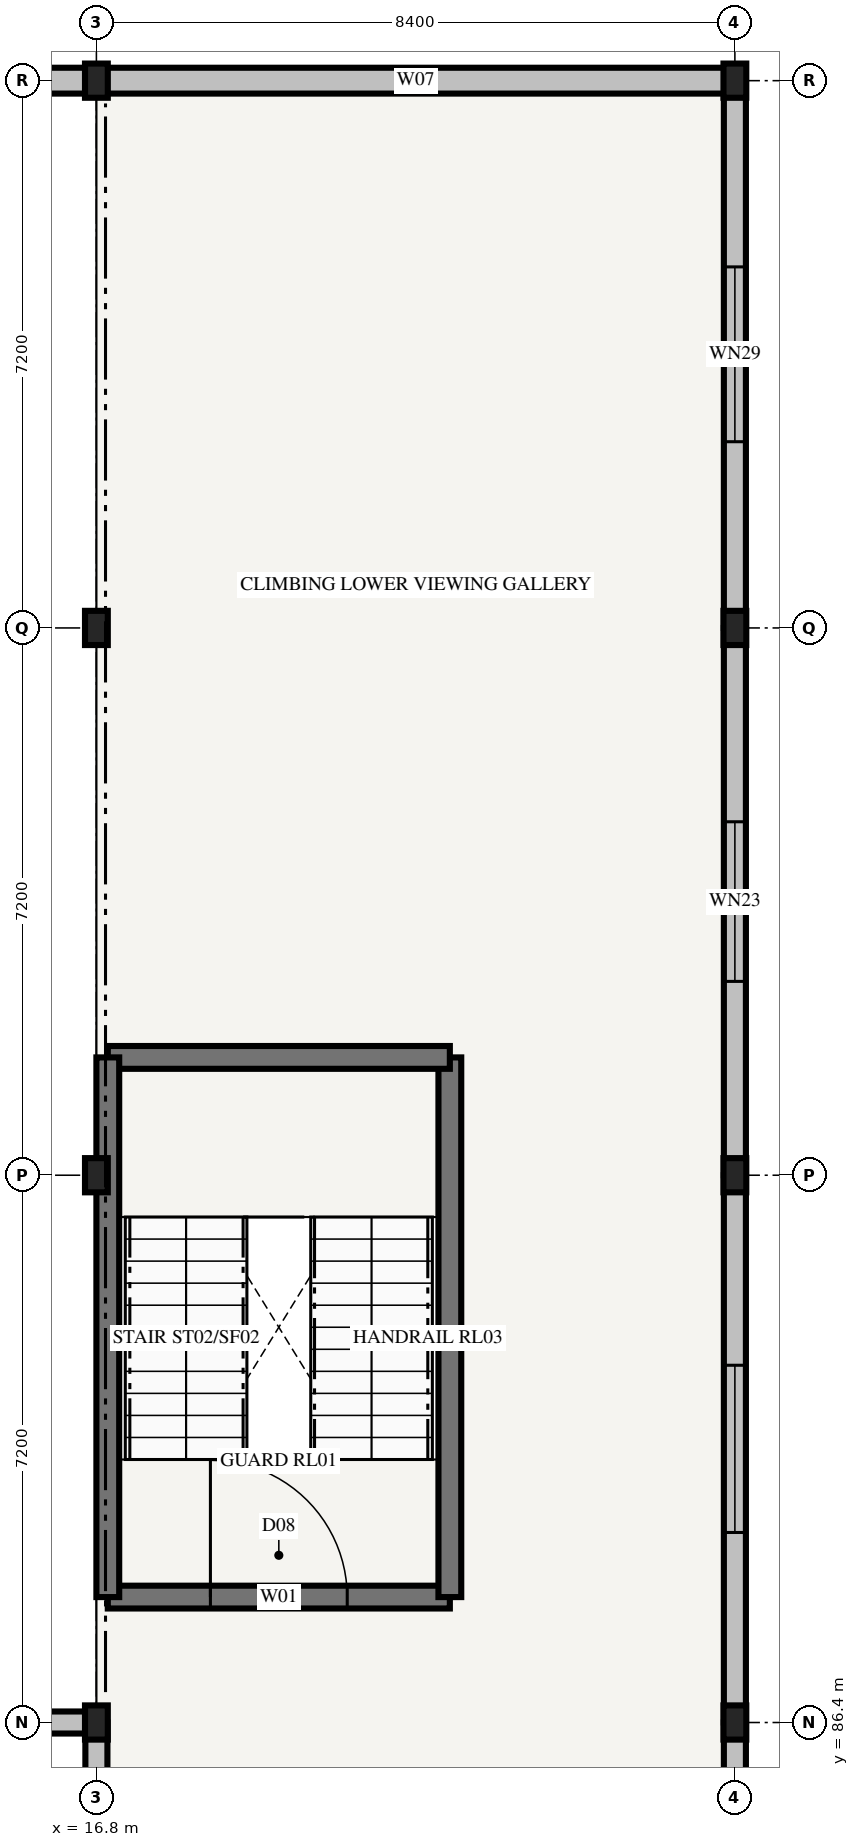
"""IFC4 building model, lengths in metres.
Left out: names, types, materials, properties, quantities, classifications, styles, units other than length and angle.
Written with IfcOpenShell. Run it as: python <this file> out.ifc"""

import sys

from ifc_helpers import new_model, si_unit, direction, frame, frame_2d, origin, origin_2d, place, context, subcontext, project, spatial, rectangle, i_section, extrude, element, fill, save


model = new_model("IFC4")
c1 = context("Model", 3, precision=1e-05, world=origin(), true_north=direction((0.0, 1.0)))
c2 = subcontext(c1, "Body", "Model", "MODEL_VIEW")
j1 = project(units=[si_unit("LENGTHUNIT", "METRE"), si_unit("PLANEANGLEUNIT", "RADIAN")], contexts=[c1])
p1 = place(None, origin())
s1 = spatial("IfcSite", under=j1, at=p1, CompositionType="ELEMENT")
p2 = place(p1, origin())
s2 = spatial("IfcBuilding", under=s1, at=p2, CompositionType="ELEMENT")
p3 = place(p2, frame((0.0, 0.0, 4.5)))
s3 = spatial("IfcBuildingStorey", under=s2, at=p3, CompositionType="ELEMENT", Elevation=4.5)
for number, where, z_axis, x_axis in (
    (1, (16.8, 86.4, 0.0), (0.0, 0.0, 1.0), (1.0, 0.0, 0.0)),
    (2, (16.8, 93.6, 0.0), (0.0, 0.0, 1.0), (1.0, 0.0, 0.0)),
    (3, (16.8, 100.8, 0.0), (0.0, 0.0, 1.0), (1.0, 0.0, 0.0)),
    (4, (16.8, 108.0, 0.0), (0.0, 0.0, 1.0), (1.0, 0.0, 0.0)),
    (5, (25.2, 86.4, 0.0), (0.0, 0.0, 1.0), (1.0, 0.0, 0.0)),
    (6, (25.2, 93.6, 0.0), (0.0, 0.0, 1.0), (1.0, 0.0, 0.0)),
    (7, (25.2, 100.8, 0.0), (0.0, 0.0, 1.0), (1.0, 0.0, 0.0)),
    (8, (25.2, 108.0, 0.0), (0.0, 0.0, 1.0), (1.0, 0.0, 0.0)),
):
    element("IfcColumn", number, at=place(p3, frame(where, z_axis=z_axis, x_axis=x_axis)), inside=s3, PredefinedType="COLUMN", context=c2, shape_type="SweptSolid", body=[
        extrude(i_section(OverallWidth=0.3, OverallDepth=0.45, WebThickness=0.014, FlangeThickness=0.026, FilletRadius=0.027, at=origin_2d()), origin(), (0.0, 0.0, 1.0), 4.2),
    ])
p4 = place(p3, frame((16.8, 86.4, 0.0), z_axis=(0.0, 0.0, 1.0), x_axis=(0.0, -1.0, 0.0)))
e9 = element("IfcWall", 9, at=p4, inside=s3, PredefinedType="STANDARD", context=c2, shape_type="SweptSolid", body=[
    extrude(rectangle(XDim=7.2, YDim=0.29, at=frame_2d((3.6, 0.0))), origin(), (0.0, 0.0, 1.0), 3.385),
])
p5 = place(p4, frame((2.5, 0.0, 0.85)))
e10 = element("IfcOpeningElement", 10, at=p5, cuts=e9, PredefinedType="OPENING", context=c2, shape_type="SweptSolid", body=[
    extrude(rectangle(XDim=2.2, YDim=1.55, at=frame_2d((1.1, 0.775))), frame((0.0, 0.17, 0.0), z_axis=(0.0, -1.0, 0.0), x_axis=(1.0, 0.0, 0.0)), (0.0, 0.0, 1.0), 0.34),
])
p6 = place(p3, frame((25.2, 79.2, 0.0), z_axis=(0.0, 0.0, 1.0), x_axis=(0.0, 1.0, 0.0)))
e11 = element("IfcWall", 11, at=p6, inside=s3, PredefinedType="STANDARD", context=c2, shape_type="SweptSolid", body=[
    extrude(rectangle(XDim=7.2, YDim=0.29, at=frame_2d((3.6, 0.0))), origin(), (0.0, 0.0, 1.0), 3.385),
])
p7 = place(p6, frame((2.7, 0.0, 0.85)))
e12 = element("IfcOpeningElement", 12, at=p7, cuts=e11, PredefinedType="OPENING", context=c2, shape_type="SweptSolid", body=[
    extrude(rectangle(XDim=1.8, YDim=1.8, at=frame_2d((0.9, 0.9))), frame((0.0, 0.17, 0.0), z_axis=(0.0, -1.0, 0.0), x_axis=(1.0, 0.0, 0.0)), (0.0, 0.0, 1.0), 0.34),
])
p8 = place(p3, frame((25.2, 86.4, 0.0), z_axis=(0.0, 0.0, 1.0), x_axis=(0.0, 1.0, 0.0)))
e13 = element("IfcWall", 13, at=p8, inside=s3, PredefinedType="STANDARD", context=c2, shape_type="SweptSolid", body=[
    extrude(rectangle(XDim=7.2, YDim=0.29, at=frame_2d((3.6, 0.0))), origin(), (0.0, 0.0, 1.0), 3.385),
])
p9 = place(p8, frame((2.5, 0.0, 0.85)))
e14 = element("IfcOpeningElement", 14, at=p9, cuts=e13, PredefinedType="OPENING", context=c2, shape_type="SweptSolid", body=[
    extrude(rectangle(XDim=2.2, YDim=1.55, at=frame_2d((1.1, 0.775))), frame((0.0, 0.17, 0.0), z_axis=(0.0, -1.0, 0.0), x_axis=(1.0, 0.0, 0.0)), (0.0, 0.0, 1.0), 0.34),
])
p10 = place(p3, frame((25.2, 93.6, 0.0), z_axis=(0.0, 0.0, 1.0), x_axis=(0.0, 1.0, 0.0)))
e15 = element("IfcWall", 15, at=p10, inside=s3, PredefinedType="STANDARD", context=c2, shape_type="SweptSolid", body=[
    extrude(rectangle(XDim=7.2, YDim=0.29, at=frame_2d((3.6, 0.0))), origin(), (0.0, 0.0, 1.0), 3.485),
])
p11 = place(p10, frame((2.55, 0.0, 0.85)))
e16 = element("IfcOpeningElement", 16, at=p11, cuts=e15, PredefinedType="OPENING", context=c2, shape_type="SweptSolid", body=[
    extrude(rectangle(XDim=2.1, YDim=1.45, at=frame_2d((1.05, 0.725))), frame((0.0, 0.17, 0.0), z_axis=(0.0, -1.0, 0.0), x_axis=(1.0, 0.0, 0.0)), (0.0, 0.0, 1.0), 0.34),
])
p12 = place(p3, frame((25.2, 100.8, 0.0), z_axis=(0.0, 0.0, 1.0), x_axis=(0.0, 1.0, 0.0)))
e17 = element("IfcWall", 17, at=p12, inside=s3, PredefinedType="STANDARD", context=c2, shape_type="SweptSolid", body=[
    extrude(rectangle(XDim=7.2, YDim=0.29, at=frame_2d((3.6, 0.0))), origin(), (0.0, 0.0, 1.0), 3.485),
])
p13 = place(p12, frame((2.45, 0.0, 0.85)))
e18 = element("IfcOpeningElement", 18, at=p13, cuts=e17, PredefinedType="OPENING", context=c2, shape_type="SweptSolid", body=[
    extrude(rectangle(XDim=2.3, YDim=2.05, at=frame_2d((1.15, 1.025))), frame((0.0, 0.17, 0.0), z_axis=(0.0, -1.0, 0.0), x_axis=(1.0, 0.0, 0.0)), (0.0, 0.0, 1.0), 0.34),
])
p14 = place(p3, frame((25.2, 108.0, 0.0), z_axis=(0.0, 0.0, 1.0), x_axis=(-1.0, 0.0, 0.0)))
e19 = element("IfcWall", 19, at=p14, inside=s3, PredefinedType="STANDARD", context=c2, shape_type="SweptSolid", body=[
    extrude(rectangle(XDim=8.4, YDim=0.34, at=frame_2d((4.2, 0.0))), origin(), (0.0, 0.0, 1.0), 3.485),
])
p15 = place(p3, frame((16.8, 108.0, 0.0), z_axis=(0.0, 0.0, 1.0), x_axis=(-1.0, 0.0, 0.0)))
e20 = element("IfcWall", 20, at=p15, inside=s3, PredefinedType="STANDARD", context=c2, shape_type="SweptSolid", body=[
    extrude(rectangle(XDim=8.4, YDim=0.34, at=frame_2d((4.2, 0.0))), origin(), (0.0, 0.0, 1.0), 3.545),
])
p16 = place(p3, frame((8.4, 86.4, 0.0), z_axis=(0.0, 0.0, 1.0), x_axis=(1.0, 0.0, 0.0)))
e21 = element("IfcWall", 21, at=p16, inside=s3, PredefinedType="STANDARD", context=c2, shape_type="SweptSolid", body=[
    extrude(rectangle(XDim=8.4, YDim=0.29, at=frame_2d((4.2, 0.0))), origin(), (0.0, 0.0, 1.0), 3.385),
])
p17 = place(p16, frame((3.225, 0.0, 0.85)))
e22 = element("IfcOpeningElement", 22, at=p17, cuts=e21, PredefinedType="OPENING", context=c2, shape_type="SweptSolid", body=[
    extrude(rectangle(XDim=1.95, YDim=1.95, at=frame_2d((0.975, 0.975))), frame((0.0, 0.17, 0.0), z_axis=(0.0, -1.0, 0.0), x_axis=(1.0, 0.0, 0.0)), (0.0, 0.0, 1.0), 0.34),
])
p18 = place(p3, frame((16.95, 88.05, 0.0), z_axis=(0.0, 0.0, 1.0), x_axis=(1.0, 0.0, 0.0)))
e23 = element("IfcWall", 23, at=p18, inside=s3, PredefinedType="SHEAR", context=c2, shape_type="SweptSolid", body=[
    extrude(rectangle(XDim=4.5, YDim=0.3, at=frame_2d((2.25, 0.0))), origin(), (0.0, 0.0, 1.0), 4.0),
])
p19 = place(p18, frame((1.35, 0.0, 0.0)))
e24 = element("IfcOpeningElement", 24, at=p19, cuts=e23, PredefinedType="OPENING", context=c2, shape_type="SweptSolid", body=[
    extrude(rectangle(XDim=1.8, YDim=2.2, at=frame_2d((0.9, 1.1))), frame((0.0, 0.175, 0.0), z_axis=(0.0, -1.0, 0.0), x_axis=(1.0, 0.0, 0.0)), (0.0, 0.0, 1.0), 0.35),
])
p20 = place(p3, frame((21.45, 88.05, 0.0), z_axis=(0.0, 0.0, 1.0), x_axis=(0.0, 1.0, 0.0)))
e25 = element("IfcWall", 25, at=p20, inside=s3, PredefinedType="SHEAR", context=c2, shape_type="SweptSolid", body=[
    extrude(rectangle(XDim=7.1, YDim=0.3, at=frame_2d((3.55, 0.0))), origin(), (0.0, 0.0, 1.0), 4.0),
])
p21 = place(p3, frame((21.45, 95.15, 0.0), z_axis=(0.0, 0.0, 1.0), x_axis=(-1.0, 0.0, 0.0)))
e26 = element("IfcWall", 26, at=p21, inside=s3, PredefinedType="SHEAR", context=c2, shape_type="SweptSolid", body=[
    extrude(rectangle(XDim=4.5, YDim=0.3, at=frame_2d((2.25, 0.0))), origin(), (0.0, 0.0, 1.0), 4.0),
])
p22 = place(p3, frame((16.95, 95.15, 0.0), z_axis=(0.0, 0.0, 1.0), x_axis=(0.0, -1.0, 0.0)))
e27 = element("IfcWall", 27, at=p22, inside=s3, PredefinedType="SHEAR", context=c2, shape_type="SweptSolid", body=[
    extrude(rectangle(XDim=7.1, YDim=0.3, at=frame_2d((3.55, 0.0))), origin(), (0.0, 0.0, 1.0), 4.0),
])
p23 = place(p9, origin())
e28 = element("IfcWindow", 28, at=p23, inside=s3, PartitioningType="SINGLE_PANEL", PredefinedType="WINDOW", context=c2, shape_type="SweptSolid", body=[
    extrude(rectangle(XDim=2.2, YDim=1.55, at=frame_2d((1.1, 0.775))), frame((0.0, 0.03, 0.0), z_axis=(0.0, -1.0, 0.0), x_axis=(1.0, 0.0, 0.0)), (0.0, 0.0, 1.0), 0.06),
])
fill(e14, e28)
p24 = place(p11, origin())
e29 = element("IfcWindow", 29, at=p24, inside=s3, PartitioningType="SINGLE_PANEL", PredefinedType="WINDOW", context=c2, shape_type="SweptSolid", body=[
    extrude(rectangle(XDim=2.1, YDim=1.45, at=frame_2d((1.05, 0.725))), frame((0.0, 0.03, 0.0), z_axis=(0.0, -1.0, 0.0), x_axis=(1.0, 0.0, 0.0)), (0.0, 0.0, 1.0), 0.06),
])
fill(e16, e29)
p25 = place(p13, origin())
e30 = element("IfcWindow", 30, at=p25, inside=s3, PartitioningType="SINGLE_PANEL", PredefinedType="WINDOW", context=c2, shape_type="SweptSolid", body=[
    extrude(rectangle(XDim=2.3, YDim=2.05, at=frame_2d((1.15, 1.025))), frame((0.0, 0.03, 0.0), z_axis=(0.0, -1.0, 0.0), x_axis=(1.0, 0.0, 0.0)), (0.0, 0.0, 1.0), 0.06),
])
fill(e18, e30)
p26 = place(p19, frame((1.8, 0.0, 0.0), z_axis=(0.0, 0.0, 1.0), x_axis=(-1.0, 0.0, 0.0)))
e31 = element("IfcDoor", 31, at=p26, inside=s3, OperationType="DOUBLE_DOOR_SINGLE_SWING", PredefinedType="DOOR", context=c2, shape_type="SweptSolid", body=[
    extrude(rectangle(XDim=1.8, YDim=2.2, at=frame_2d((0.9, 1.1))), frame((0.0, 0.025, 0.0), z_axis=(0.0, -1.0, 0.0), x_axis=(1.0, 0.0, 0.0)), (0.0, 0.0, 1.0), 0.05),
])
fill(e24, e31)
save(model, sys.argv[1])
